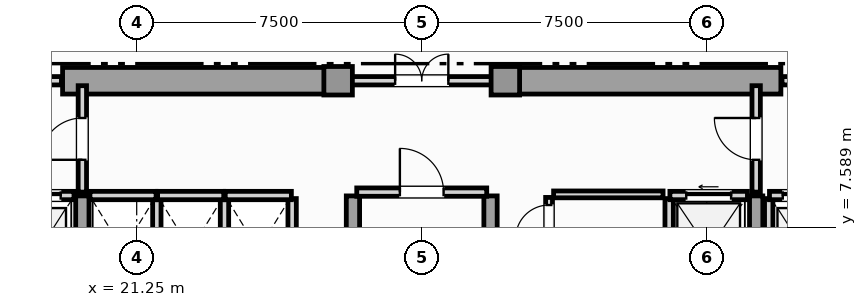
"""IFC4 building model, lengths in metres.
Left out: names, types, materials, properties, quantities, classifications, styles, units other than length and angle.
Written with IfcOpenShell. Run it as: python <this file> out.ifc"""

import sys

from ifc_helpers import new_model, si_unit, direction, frame, frame_2d, origin, origin_2d, place, context, subcontext, project, spatial, rectangle, extrude, element, fill, save


model = new_model("IFC4")
c1 = context("Model", 3, precision=1e-05, world=origin(), true_north=direction((0.0, 1.0)))
c2 = subcontext(c1, "Body", "Model", "MODEL_VIEW")
j1 = project(units=[si_unit("LENGTHUNIT", "METRE"), si_unit("PLANEANGLEUNIT", "RADIAN")], contexts=[c1])
p1 = place(None, origin())
s1 = spatial("IfcSite", under=j1, at=p1, CompositionType="ELEMENT")
p2 = place(p1, origin())
s2 = spatial("IfcBuilding", under=s1, at=p2, CompositionType="ELEMENT")
p3 = place(p2, frame((0.0, 0.0, 104.15)))
s3 = spatial("IfcBuildingStorey", under=s2, at=p3, CompositionType="ELEMENT", Elevation=104.15)
for number, where, z_axis, x_axis in (
    (1, (19.3, 11.45, 0.0), (0.0, 0.0, 1.0), (1.0, 0.0, 0.0)),
    (2, (30.9, 11.45, 0.0), (0.0, 0.0, 1.0), (1.0, 0.0, 0.0)),
):
    element("IfcWall", number, at=place(p3, frame(where, z_axis=z_axis, x_axis=x_axis)), inside=s3, PredefinedType="SHEAR", context=c2, shape_type="SweptSolid", body=[
        extrude(rectangle(XDim=7.3, YDim=0.7, at=frame_2d((3.65, 0.0))), origin(), (0.0, 0.0, 1.0), 3.6),
    ])
for number, where, z_axis, x_axis in (
    (3, (19.82, 0.92, 0.0), (0.0, 0.0, 1.0), (0.0, 1.0, 0.0)),
    (4, (26.94, 0.92, 0.0), (0.0, 0.0, 1.0), (0.0, 1.0, 0.0)),
    (5, (30.56, 0.92, 0.0), (0.0, 0.0, 1.0), (0.0, 1.0, 0.0)),
    (6, (37.55, 0.92, 0.0), (0.0, 0.0, 1.0), (0.0, 1.0, 0.0)),
):
    element("IfcWall", number, at=place(p3, frame(where, z_axis=z_axis, x_axis=x_axis)), inside=s3, PredefinedType="SHEAR", context=c2, shape_type="SweptSolid", body=[
        extrude(rectangle(XDim=7.5, YDim=0.35, at=frame_2d((3.75, 0.0))), origin(), (0.0, 0.0, 1.0), 3.6),
    ])
for number, where, z_axis, x_axis in (
    (7, (26.55, 11.45, 0.0), (0.0, 0.0, 1.0), (1.0, 0.0, 0.0)),
    (8, (30.95, 11.45, 0.0), (0.0, 0.0, 1.0), (1.0, 0.0, 0.0)),
):
    element("IfcColumn", number, at=place(p3, frame(where, z_axis=z_axis, x_axis=x_axis)), inside=s3, PredefinedType="COLUMN", context=c2, shape_type="SweptSolid", body=[
        extrude(rectangle(XDim=0.75, YDim=0.75, at=origin_2d()), origin(), (0.0, 0.0, 1.0), 3.85),
    ])
p4 = place(p3, frame((17.78, 8.43, 0.0), z_axis=(0.0, 0.0, 1.0), x_axis=(1.0, 0.0, 0.0)))
e9 = element("IfcWall", 9, at=p4, inside=s3, PredefinedType="SOLIDWALL", context=c2, shape_type="SweptSolid", body=[
    extrude(rectangle(XDim=1.82, YDim=0.22, at=frame_2d((0.91, 0.0))), origin(), (0.0, 0.0, 1.0), 3.6),
])
p5 = place(p4, frame((0.35, 0.0, 0.0)))
e10 = element("IfcOpeningElement", 10, at=p5, cuts=e9, PredefinedType="OPENING", context=c2, shape_type="SweptSolid", body=[
    extrude(rectangle(XDim=1.12, YDim=2.25, at=frame_2d((0.56, 1.125))), frame((0.0, 0.12, 0.0), z_axis=(0.0, -1.0, 0.0), x_axis=(1.0, 0.0, 0.0)), (0.0, 0.0, 1.0), 0.24),
])
p6 = place(p3, frame((37.88, 5.65, 0.0), z_axis=(0.0, 0.0, 1.0), x_axis=(0.0, 1.0, 0.0)))
e11 = element("IfcWall", 11, at=p6, inside=s3, PredefinedType="SOLIDWALL", context=c2, shape_type="SweptSolid", body=[
    extrude(rectangle(XDim=2.7, YDim=0.22, at=frame_2d((1.35, 0.0))), origin(), (0.0, 0.0, 1.0), 3.6),
])
p7 = place(p3, frame((37.9, 8.43, 0.0), z_axis=(0.0, 0.0, 1.0), x_axis=(1.0, 0.0, 0.0)))
e12 = element("IfcWall", 12, at=p7, inside=s3, PredefinedType="SOLIDWALL", context=c2, shape_type="SweptSolid", body=[
    extrude(rectangle(XDim=1.82, YDim=0.22, at=frame_2d((0.91, 0.0))), origin(), (0.0, 0.0, 1.0), 3.6),
])
p8 = place(p7, frame((0.35, 0.0, 0.0)))
e13 = element("IfcOpeningElement", 13, at=p8, cuts=e12, PredefinedType="OPENING", context=c2, shape_type="SweptSolid", body=[
    extrude(rectangle(XDim=1.12, YDim=2.25, at=frame_2d((0.56, 1.125))), frame((0.0, 0.12, 0.0), z_axis=(0.0, -1.0, 0.0), x_axis=(1.0, 0.0, 0.0)), (0.0, 0.0, 1.0), 0.24),
])
p9 = place(p3, frame((35.26, 5.65, 0.0), z_axis=(0.0, 0.0, 1.0), x_axis=(0.0, 1.0, 0.0)))
e14 = element("IfcWall", 14, at=p9, inside=s3, PredefinedType="SOLIDWALL", context=c2, shape_type="SweptSolid", body=[
    extrude(rectangle(XDim=2.7, YDim=0.22, at=frame_2d((1.35, 0.0))), origin(), (0.0, 0.0, 1.0), 3.6),
])
p10 = place(p3, frame((35.28, 8.43, 0.0), z_axis=(0.0, 0.0, 1.0), x_axis=(1.0, 0.0, 0.0)))
e15 = element("IfcWall", 15, at=p10, inside=s3, PredefinedType="SOLIDWALL", context=c2, shape_type="SweptSolid", body=[
    extrude(rectangle(XDim=2.04, YDim=0.22, at=frame_2d((1.02, 0.0))), origin(), (0.0, 0.0, 1.0), 3.6),
])
p11 = place(p10, frame((0.43, 0.0, 0.0)))
e16 = element("IfcOpeningElement", 16, at=p11, cuts=e15, PredefinedType="OPENING", context=c2, shape_type="SweptSolid", body=[
    extrude(rectangle(XDim=1.18, YDim=2.2, at=frame_2d((0.59, 1.1))), frame((0.0, 0.12, 0.0), z_axis=(0.0, -1.0, 0.0), x_axis=(1.0, 0.0, 0.0)), (0.0, 0.0, 1.0), 0.24),
])
p12 = place(p3, frame((21.78, 5.65, 0.0), z_axis=(0.0, 0.0, 1.0), x_axis=(0.0, 1.0, 0.0)))
e17 = element("IfcWall", 17, at=p12, inside=s3, PredefinedType="SOLIDWALL", context=c2, shape_type="SweptSolid", body=[
    extrude(rectangle(XDim=2.7, YDim=0.22, at=frame_2d((1.35, 0.0))), origin(), (0.0, 0.0, 1.0), 3.6),
])
p13 = place(p3, frame((20.02, 8.43, 0.0), z_axis=(0.0, 0.0, 1.0), x_axis=(1.0, 0.0, 0.0)))
e18 = element("IfcWall", 18, at=p13, inside=s3, PredefinedType="SOLIDWALL", context=c2, shape_type="SweptSolid", body=[
    extrude(rectangle(XDim=1.74, YDim=0.22, at=frame_2d((0.87, 0.0))), origin(), (0.0, 0.0, 1.0), 3.6),
])
p14 = place(p3, frame((23.56, 5.65, 0.0), z_axis=(0.0, 0.0, 1.0), x_axis=(0.0, 1.0, 0.0)))
e19 = element("IfcWall", 19, at=p14, inside=s3, PredefinedType="SOLIDWALL", context=c2, shape_type="SweptSolid", body=[
    extrude(rectangle(XDim=2.7, YDim=0.22, at=frame_2d((1.35, 0.0))), origin(), (0.0, 0.0, 1.0), 3.6),
])
p15 = place(p3, frame((21.8, 8.43, 0.0), z_axis=(0.0, 0.0, 1.0), x_axis=(1.0, 0.0, 0.0)))
e20 = element("IfcWall", 20, at=p15, inside=s3, PredefinedType="SOLIDWALL", context=c2, shape_type="SweptSolid", body=[
    extrude(rectangle(XDim=1.74, YDim=0.22, at=frame_2d((0.87, 0.0))), origin(), (0.0, 0.0, 1.0), 3.6),
])
p16 = place(p3, frame((25.34, 5.65, 0.0), z_axis=(0.0, 0.0, 1.0), x_axis=(0.0, 1.0, 0.0)))
e21 = element("IfcWall", 21, at=p16, inside=s3, PredefinedType="SOLIDWALL", context=c2, shape_type="SweptSolid", body=[
    extrude(rectangle(XDim=2.7, YDim=0.22, at=frame_2d((1.35, 0.0))), origin(), (0.0, 0.0, 1.0), 3.6),
])
p17 = place(p3, frame((23.58, 8.43, 0.0), z_axis=(0.0, 0.0, 1.0), x_axis=(1.0, 0.0, 0.0)))
e22 = element("IfcWall", 22, at=p17, inside=s3, PredefinedType="SOLIDWALL", context=c2, shape_type="SweptSolid", body=[
    extrude(rectangle(XDim=1.74, YDim=0.22, at=frame_2d((0.87, 0.0))), origin(), (0.0, 0.0, 1.0), 3.6),
])
p18 = place(p3, frame((27.04, 8.52, 0.0), z_axis=(0.0, 0.0, 1.0), x_axis=(1.0, 0.0, 0.0)))
e23 = element("IfcWall", 23, at=p18, inside=s3, PredefinedType="SOLIDWALL", context=c2, shape_type="SweptSolid", body=[
    extrude(rectangle(XDim=3.42, YDim=0.22, at=frame_2d((1.71, 0.0))), origin(), (0.0, 0.0, 1.0), 3.6),
])
p19 = place(p18, frame((1.135, 0.0, 0.0)))
e24 = element("IfcOpeningElement", 24, at=p19, cuts=e23, PredefinedType="OPENING", context=c2, shape_type="SweptSolid", body=[
    extrude(rectangle(XDim=1.15, YDim=2.2, at=frame_2d((0.575, 1.1))), frame((0.0, 0.12, 0.0), z_axis=(0.0, -1.0, 0.0), x_axis=(1.0, 0.0, 0.0)), (0.0, 0.0, 1.0), 0.24),
])
p20 = place(p3, frame((19.82, 8.52, 0.0), z_axis=(0.0, 0.0, 1.0), x_axis=(0.0, 1.0, 0.0)))
e25 = element("IfcWall", 25, at=p20, inside=s3, PredefinedType="SOLIDWALL", context=c2, shape_type="SweptSolid", body=[
    extrude(rectangle(XDim=2.8, YDim=0.22, at=frame_2d((1.4, 0.0))), origin(), (0.0, 0.0, 1.0), 3.056),
])
p21 = place(p20, frame((0.85, 0.0, 0.0)))
e26 = element("IfcOpeningElement", 26, at=p21, cuts=e25, PredefinedType="OPENING", context=c2, shape_type="SweptSolid", body=[
    extrude(rectangle(XDim=1.1, YDim=2.2, at=frame_2d((0.55, 1.1))), frame((0.0, 0.12, 0.0), z_axis=(0.0, -1.0, 0.0), x_axis=(1.0, 0.0, 0.0)), (0.0, 0.0, 1.0), 0.24),
])
p22 = place(p3, frame((37.55, 8.52, 0.0), z_axis=(0.0, 0.0, 1.0), x_axis=(0.0, 1.0, 0.0)))
e27 = element("IfcWall", 27, at=p22, inside=s3, PredefinedType="SOLIDWALL", context=c2, shape_type="SweptSolid", body=[
    extrude(rectangle(XDim=2.8, YDim=0.22, at=frame_2d((1.4, 0.0))), origin(), (0.0, 0.0, 1.0), 3.056),
])
p23 = place(p22, frame((0.85, 0.0, 0.0)))
e28 = element("IfcOpeningElement", 28, at=p23, cuts=e27, PredefinedType="OPENING", context=c2, shape_type="SweptSolid", body=[
    extrude(rectangle(XDim=1.1, YDim=2.2, at=frame_2d((0.55, 1.1))), frame((0.0, 0.12, 0.0), z_axis=(0.0, -1.0, 0.0), x_axis=(1.0, 0.0, 0.0)), (0.0, 0.0, 1.0), 0.24),
])
p24 = place(p3, frame((16.23, 11.45, 0.0), z_axis=(0.0, 0.0, 1.0), x_axis=(1.0, 0.0, 0.0)))
e29 = element("IfcWall", 29, at=p24, inside=s3, PredefinedType="SOLIDWALL", context=c2, shape_type="SweptSolid", body=[
    extrude(rectangle(XDim=3.04, YDim=0.22, at=frame_2d((1.52, 0.0))), origin(), (0.0, 0.0, 1.0), 3.6),
])
p25 = place(p24, frame((0.97, 0.0, 0.0)))
e30 = element("IfcOpeningElement", 30, at=p25, cuts=e29, PredefinedType="OPENING", context=c2, shape_type="SweptSolid", body=[
    extrude(rectangle(XDim=1.1, YDim=2.2, at=frame_2d((0.55, 1.1))), frame((0.0, 0.12, 0.0), z_axis=(0.0, -1.0, 0.0), x_axis=(1.0, 0.0, 0.0)), (0.0, 0.0, 1.0), 0.24),
])
p26 = place(p3, frame((26.63, 11.45, 0.0), z_axis=(0.0, 0.0, 1.0), x_axis=(1.0, 0.0, 0.0)))
e31 = element("IfcWall", 31, at=p26, inside=s3, PredefinedType="SOLIDWALL", context=c2, shape_type="SweptSolid", body=[
    extrude(rectangle(XDim=4.24, YDim=0.22, at=frame_2d((2.12, 0.0))), origin(), (0.0, 0.0, 1.0), 3.6),
])
p27 = place(p26, frame((1.42, 0.0, 0.0)))
e32 = element("IfcOpeningElement", 32, at=p27, cuts=e31, PredefinedType="OPENING", context=c2, shape_type="SweptSolid", body=[
    extrude(rectangle(XDim=1.4, YDim=2.2, at=frame_2d((0.7, 1.1))), frame((0.0, 0.12, 0.0), z_axis=(0.0, -1.0, 0.0), x_axis=(1.0, 0.0, 0.0)), (0.0, 0.0, 1.0), 0.24),
])
p28 = place(p3, frame((38.23, 11.45, 0.0), z_axis=(0.0, 0.0, 1.0), x_axis=(1.0, 0.0, 0.0)))
e33 = element("IfcWall", 33, at=p28, inside=s3, PredefinedType="SOLIDWALL", context=c2, shape_type="SweptSolid", body=[
    extrude(rectangle(XDim=3.04, YDim=0.22, at=frame_2d((1.52, 0.0))), origin(), (0.0, 0.0, 1.0), 3.6),
])
p29 = place(p28, frame((0.97, 0.0, 0.0)))
e34 = element("IfcOpeningElement", 34, at=p29, cuts=e33, PredefinedType="OPENING", context=c2, shape_type="SweptSolid", body=[
    extrude(rectangle(XDim=1.1, YDim=2.2, at=frame_2d((0.55, 1.1))), frame((0.0, 0.12, 0.0), z_axis=(0.0, -1.0, 0.0), x_axis=(1.0, 0.0, 0.0)), (0.0, 0.0, 1.0), 0.24),
])
p30 = place(p3, frame((32.1, 7.1, 0.0), z_axis=(0.0, 0.0, 1.0), x_axis=(0.0, 1.0, 0.0)))
e35 = element("IfcWall", 35, at=p30, inside=s3, PredefinedType="PARTITIONING", context=c2, shape_type="SweptSolid", body=[
    extrude(rectangle(XDim=1.28, YDim=0.18, at=frame_2d((0.64, 0.0))), origin(), (0.0, 0.0, 1.0), 3.6),
])
p31 = place(p30, frame((0.2, 0.0, 0.0)))
e36 = element("IfcOpeningElement", 36, at=p31, cuts=e35, PredefinedType="OPENING", context=c2, shape_type="SweptSolid", body=[
    extrude(rectangle(XDim=0.88, YDim=2.05, at=frame_2d((0.44, 1.025))), frame((0.0, 0.1, 0.0), z_axis=(0.0, -1.0, 0.0), x_axis=(1.0, 0.0, 0.0)), (0.0, 0.0, 1.0), 0.2),
])
p32 = place(p3, frame((32.22, 8.46, 0.0), z_axis=(0.0, 0.0, 1.0), x_axis=(1.0, 0.0, 0.0)))
e37 = element("IfcWall", 37, at=p32, inside=s3, PredefinedType="PARTITIONING", context=c2, shape_type="SweptSolid", body=[
    extrude(rectangle(XDim=2.88, YDim=0.18, at=frame_2d((1.44, 0.0))), origin(), (0.0, 0.0, 1.0), 3.6),
])
p33 = place(p5, origin())
e38 = element("IfcDoor", 38, at=p33, inside=s3, OperationType="SLIDING_TO_LEFT", PredefinedType="DOOR", context=c2, shape_type="SweptSolid", body=[
    extrude(rectangle(XDim=1.12, YDim=2.25, at=frame_2d((0.56, 1.125))), frame((0.0, 0.025, 0.0), z_axis=(0.0, -1.0, 0.0), x_axis=(1.0, 0.0, 0.0)), (0.0, 0.0, 1.0), 0.05),
])
fill(e10, e38)
p34 = place(p8, origin())
e39 = element("IfcDoor", 39, at=p34, inside=s3, OperationType="SLIDING_TO_RIGHT", PredefinedType="DOOR", context=c2, shape_type="SweptSolid", body=[
    extrude(rectangle(XDim=1.12, YDim=2.25, at=frame_2d((0.56, 1.125))), frame((0.0, 0.025, 0.0), z_axis=(0.0, -1.0, 0.0), x_axis=(1.0, 0.0, 0.0)), (0.0, 0.0, 1.0), 0.05),
])
fill(e13, e39)
p35 = place(p11, origin())
e40 = element("IfcDoor", 40, at=p35, inside=s3, OperationType="SLIDING_TO_LEFT", PredefinedType="DOOR", context=c2, shape_type="SweptSolid", body=[
    extrude(rectangle(XDim=1.18, YDim=2.2, at=frame_2d((0.59, 1.1))), frame((0.0, 0.025, 0.0), z_axis=(0.0, -1.0, 0.0), x_axis=(1.0, 0.0, 0.0)), (0.0, 0.0, 1.0), 0.05),
])
fill(e16, e40)
p36 = place(p19, origin())
e41 = element("IfcDoor", 41, at=p36, inside=s3, OperationType="SINGLE_SWING_LEFT", PredefinedType="DOOR", context=c2, shape_type="SweptSolid", body=[
    extrude(rectangle(XDim=1.15, YDim=2.2, at=frame_2d((0.575, 1.1))), frame((0.0, 0.025, 0.0), z_axis=(0.0, -1.0, 0.0), x_axis=(1.0, 0.0, 0.0)), (0.0, 0.0, 1.0), 0.05),
])
fill(e24, e41)
p37 = place(p21, origin())
e42 = element("IfcDoor", 42, at=p37, inside=s3, OperationType="SINGLE_SWING_LEFT", PredefinedType="DOOR", context=c2, shape_type="SweptSolid", body=[
    extrude(rectangle(XDim=1.1, YDim=2.2, at=frame_2d((0.55, 1.1))), frame((0.0, 0.025, 0.0), z_axis=(0.0, -1.0, 0.0), x_axis=(1.0, 0.0, 0.0)), (0.0, 0.0, 1.0), 0.05),
])
fill(e26, e42)
p38 = place(p23, origin())
e43 = element("IfcDoor", 43, at=p38, inside=s3, OperationType="SINGLE_SWING_RIGHT", PredefinedType="DOOR", context=c2, shape_type="SweptSolid", body=[
    extrude(rectangle(XDim=1.1, YDim=2.2, at=frame_2d((0.55, 1.1))), frame((0.0, 0.025, 0.0), z_axis=(0.0, -1.0, 0.0), x_axis=(1.0, 0.0, 0.0)), (0.0, 0.0, 1.0), 0.05),
])
fill(e28, e43)
p39 = place(p27, origin())
e44 = element("IfcDoor", 44, at=p39, inside=s3, OperationType="DOUBLE_DOOR_SINGLE_SWING", PredefinedType="DOOR", context=c2, shape_type="SweptSolid", body=[
    extrude(rectangle(XDim=1.4, YDim=2.2, at=frame_2d((0.7, 1.1))), frame((0.0, 0.025, 0.0), z_axis=(0.0, -1.0, 0.0), x_axis=(1.0, 0.0, 0.0)), (0.0, 0.0, 1.0), 0.05),
])
fill(e32, e44)
p40 = place(p31, origin())
e45 = element("IfcDoor", 45, at=p40, inside=s3, OperationType="SINGLE_SWING_LEFT", PredefinedType="DOOR", context=c2, shape_type="SweptSolid", body=[
    extrude(rectangle(XDim=0.88, YDim=2.05, at=frame_2d((0.44, 1.025))), frame((0.0, 0.025, 0.0), z_axis=(0.0, -1.0, 0.0), x_axis=(1.0, 0.0, 0.0)), (0.0, 0.0, 1.0), 0.05),
])
fill(e36, e45)
save(model, sys.argv[1])
